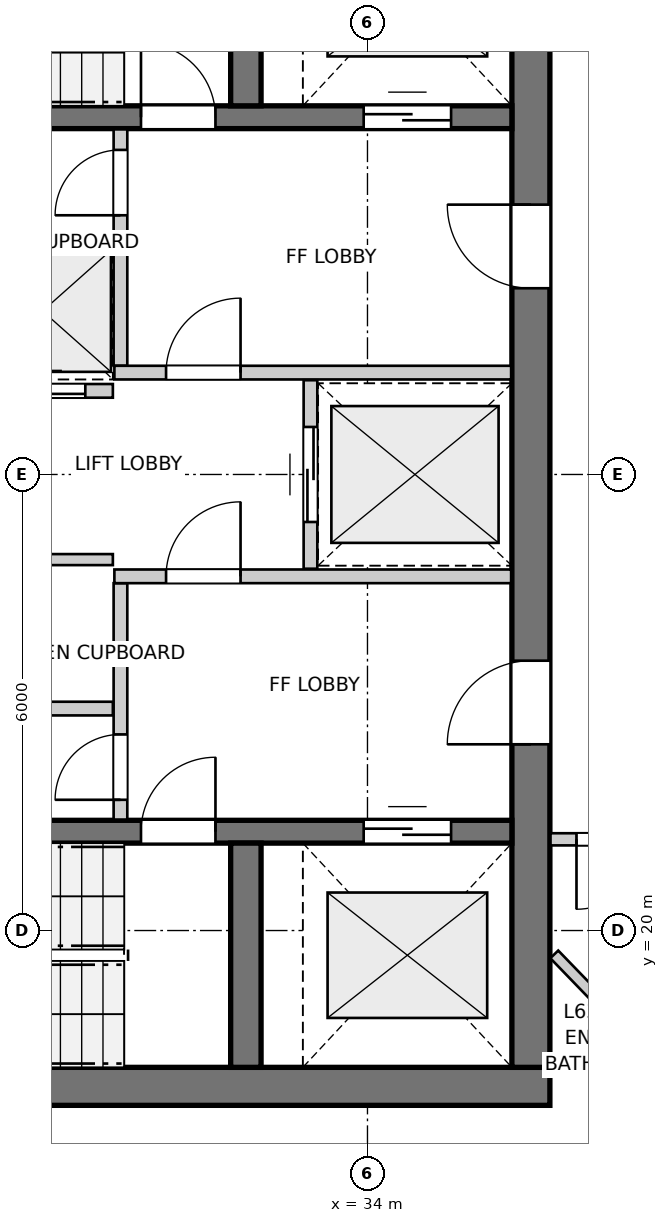
"""IFC4 building model, lengths in metres.
Left out: names, types, materials, properties, quantities, classifications, styles, units other than length and angle.
Written with IfcOpenShell. Run it as: python <this file> out.ifc"""

import sys

from ifc_helpers import new_model, si_unit, direction, frame, frame_2d, origin, place, context, subcontext, project, spatial, rectangle, extrude, source, transform, mapped, element, fill, save


model = new_model("IFC4")
c1 = context("Model", 3, precision=1e-05, world=origin(), true_north=direction((0.0, 1.0)))
c2 = subcontext(c1, "Body", "Model", "MODEL_VIEW")
j1 = project(units=[si_unit("LENGTHUNIT", "METRE"), si_unit("PLANEANGLEUNIT", "RADIAN")], contexts=[c1])
p1 = place(None, origin())
s1 = spatial("IfcSite", under=j1, at=p1, CompositionType="ELEMENT")
p2 = place(p1, origin())
s2 = spatial("IfcBuilding", under=s1, at=p2, CompositionType="ELEMENT")
p3 = place(p2, frame((0.0, 0.0, 211.6)))
s3 = spatial("IfcBuildingStorey", under=s2, at=p3, CompositionType="ELEMENT", Elevation=211.6)
p4 = place(p3, frame((24.3, 17.95, 0.0), z_axis=(0.0, 0.0, 1.0), x_axis=(1.0, 0.0, 0.0)))
e1 = element("IfcWall", 1, at=p4, inside=s3, PredefinedType="SHEAR", context=c2, shape_type="SweptSolid", body=[
    extrude(rectangle(XDim=12.1, YDim=0.5, at=frame_2d((6.05, 0.0))), origin(), (0.0, 0.0, 1.0), 2.96),
])
p5 = place(p3, frame((36.15, 18.2, 0.0), z_axis=(0.0, 0.0, 1.0), x_axis=(0.0, 1.0, 0.0)))
e2 = element("IfcWall", 2, at=p5, inside=s3, PredefinedType="SHEAR", context=c2, shape_type="SweptSolid", body=[
    extrude(rectangle(XDim=15.6, YDim=0.5, at=frame_2d((7.8, 0.0))), origin(), (0.0, 0.0, 1.0), 2.96),
])
p6 = place(p5, frame((4.25, 0.0, 0.0)))
e3 = element("IfcOpeningElement", 3, at=p6, cuts=e2, PredefinedType="OPENING", context=c2, shape_type="SweptSolid", body=[
    extrude(rectangle(XDim=1.1, YDim=2.15, at=frame_2d((0.55, 1.075))), frame((0.0, 0.26, 0.0), z_axis=(0.0, -1.0, 0.0), x_axis=(1.0, 0.0, 0.0)), (0.0, 0.0, 1.0), 0.52),
])
p7 = place(p5, frame((10.25, 0.0, 0.0)))
e4 = element("IfcOpeningElement", 4, at=p7, cuts=e2, PredefinedType="OPENING", context=c2, shape_type="SweptSolid", body=[
    extrude(rectangle(XDim=1.1, YDim=2.15, at=frame_2d((0.55, 1.075))), frame((0.0, 0.26, 0.0), z_axis=(0.0, -1.0, 0.0), x_axis=(1.0, 0.0, 0.0)), (0.0, 0.0, 1.0), 0.52),
])
p8 = place(p3, frame((24.8, 21.3, 0.0), z_axis=(0.0, 0.0, 1.0), x_axis=(1.0, 0.0, 0.0)))
e5 = element("IfcWall", 5, at=p8, inside=s3, PredefinedType="SHEAR", context=c2, shape_type="SweptSolid", body=[
    extrude(rectangle(XDim=11.1, YDim=0.3, at=frame_2d((5.55, 0.0))), origin(), (0.0, 0.0, 1.0), 2.96),
])
p9 = place(p8, frame((6.22, 0.0, 0.0)))
e6 = element("IfcOpeningElement", 6, at=p9, cuts=e5, PredefinedType="OPENING", context=c2, shape_type="SweptSolid", body=[
    extrude(rectangle(XDim=0.98, YDim=2.15, at=frame_2d((0.49, 1.075))), frame((0.0, 0.16, 0.0), z_axis=(0.0, -1.0, 0.0), x_axis=(1.0, 0.0, 0.0)), (0.0, 0.0, 1.0), 0.32),
])
p10 = place(p8, frame((9.15, 0.0, 0.0)))
e7 = element("IfcOpeningElement", 7, at=p10, cuts=e5, PredefinedType="OPENING", context=c2, shape_type="SweptSolid", body=[
    extrude(rectangle(XDim=1.15, YDim=2.15, at=frame_2d((0.575, 1.075))), frame((0.0, 0.16, 0.0), z_axis=(0.0, -1.0, 0.0), x_axis=(1.0, 0.0, 0.0)), (0.0, 0.0, 1.0), 0.32),
])
p11 = place(p3, frame((32.4, 18.2, 0.0), z_axis=(0.0, 0.0, 1.0), x_axis=(0.0, 1.0, 0.0)))
e8 = element("IfcWall", 8, at=p11, inside=s3, PredefinedType="SHEAR", context=c2, shape_type="SweptSolid", body=[
    extrude(rectangle(XDim=2.95, YDim=0.4, at=frame_2d((1.475, 0.0))), origin(), (0.0, 0.0, 1.0), 2.96),
])
p12 = place(p3, frame((24.8, 30.7, 0.0), z_axis=(0.0, 0.0, 1.0), x_axis=(1.0, 0.0, 0.0)))
e9 = element("IfcWall", 9, at=p12, inside=s3, PredefinedType="SHEAR", context=c2, shape_type="SweptSolid", body=[
    extrude(rectangle(XDim=11.1, YDim=0.3, at=frame_2d((5.55, 0.0))), origin(), (0.0, 0.0, 1.0), 2.96),
])
p13 = place(p12, frame((6.22, 0.0, 0.0)))
e10 = element("IfcOpeningElement", 10, at=p13, cuts=e9, PredefinedType="OPENING", context=c2, shape_type="SweptSolid", body=[
    extrude(rectangle(XDim=0.98, YDim=2.15, at=frame_2d((0.49, 1.075))), frame((0.0, 0.16, 0.0), z_axis=(0.0, -1.0, 0.0), x_axis=(1.0, 0.0, 0.0)), (0.0, 0.0, 1.0), 0.32),
])
p14 = place(p12, frame((9.15, 0.0, 0.0)))
e11 = element("IfcOpeningElement", 11, at=p14, cuts=e9, PredefinedType="OPENING", context=c2, shape_type="SweptSolid", body=[
    extrude(rectangle(XDim=1.15, YDim=2.15, at=frame_2d((0.575, 1.075))), frame((0.0, 0.16, 0.0), z_axis=(0.0, -1.0, 0.0), x_axis=(1.0, 0.0, 0.0)), (0.0, 0.0, 1.0), 0.32),
])
p15 = place(p3, frame((32.4, 30.85, 0.0), z_axis=(0.0, 0.0, 1.0), x_axis=(0.0, 1.0, 0.0)))
e12 = element("IfcWall", 12, at=p15, inside=s3, PredefinedType="SHEAR", context=c2, shape_type="SweptSolid", body=[
    extrude(rectangle(XDim=2.95, YDim=0.4, at=frame_2d((1.475, 0.0))), origin(), (0.0, 0.0, 1.0), 2.96),
])
p16 = place(p3, frame((30.75, 21.46, 0.0), z_axis=(0.0, 0.0, 1.0), x_axis=(0.0, 1.0, 0.0)))
e13 = element("IfcWall", 13, at=p16, inside=s3, PredefinedType="PARTITIONING", context=c2, shape_type="SweptSolid", body=[
    extrude(rectangle(XDim=3.11, YDim=0.18, at=frame_2d((1.555, 0.0))), origin(), (0.0, 0.0, 1.0), 2.96),
])
p17 = place(p16, frame((0.26, 0.0, 0.0)))
e14 = element("IfcOpeningElement", 14, at=p17, cuts=e13, PredefinedType="OPENING", context=c2, shape_type="SweptSolid", body=[
    extrude(rectangle(XDim=0.86, YDim=2.05, at=frame_2d((0.43, 1.025))), frame((0.0, 0.1, 0.0), z_axis=(0.0, -1.0, 0.0), x_axis=(1.0, 0.0, 0.0)), (0.0, 0.0, 1.0), 0.2),
])
p18 = place(p3, frame((30.67, 24.66, 0.0), z_axis=(0.0, 0.0, 1.0), x_axis=(1.0, 0.0, 0.0)))
e15 = element("IfcWall", 15, at=p18, inside=s3, PredefinedType="PARTITIONING", context=c2, shape_type="SweptSolid", body=[
    extrude(rectangle(XDim=5.22, YDim=0.18, at=frame_2d((2.61, 0.0))), origin(), (0.0, 0.0, 1.0), 2.96),
])
p19 = place(p18, frame((0.68, 0.0, 0.0)))
e16 = element("IfcOpeningElement", 16, at=p19, cuts=e15, PredefinedType="OPENING", context=c2, shape_type="SweptSolid", body=[
    extrude(rectangle(XDim=0.98, YDim=2.15, at=frame_2d((0.49, 1.075))), frame((0.0, 0.1, 0.0), z_axis=(0.0, -1.0, 0.0), x_axis=(1.0, 0.0, 0.0)), (0.0, 0.0, 1.0), 0.2),
])
p20 = place(p3, frame((30.75, 27.43, 0.0), z_axis=(0.0, 0.0, 1.0), x_axis=(0.0, 1.0, 0.0)))
e17 = element("IfcWall", 17, at=p20, inside=s3, PredefinedType="PARTITIONING", context=c2, shape_type="SweptSolid", body=[
    extrude(rectangle(XDim=3.11, YDim=0.18, at=frame_2d((1.555, 0.0))), origin(), (0.0, 0.0, 1.0), 2.96),
])
p21 = place(p20, frame((1.98, 0.0, 0.0)))
e18 = element("IfcOpeningElement", 18, at=p21, cuts=e17, PredefinedType="OPENING", context=c2, shape_type="SweptSolid", body=[
    extrude(rectangle(XDim=0.86, YDim=2.05, at=frame_2d((0.43, 1.025))), frame((0.0, 0.1, 0.0), z_axis=(0.0, -1.0, 0.0), x_axis=(1.0, 0.0, 0.0)), (0.0, 0.0, 1.0), 0.2),
])
p22 = place(p3, frame((30.67, 27.34, 0.0), z_axis=(0.0, 0.0, 1.0), x_axis=(1.0, 0.0, 0.0)))
e19 = element("IfcWall", 19, at=p22, inside=s3, PredefinedType="PARTITIONING", context=c2, shape_type="SweptSolid", body=[
    extrude(rectangle(XDim=5.22, YDim=0.18, at=frame_2d((2.61, 0.0))), origin(), (0.0, 0.0, 1.0), 2.96),
])
p23 = place(p22, frame((0.68, 0.0, 0.0)))
e20 = element("IfcOpeningElement", 20, at=p23, cuts=e19, PredefinedType="OPENING", context=c2, shape_type="SweptSolid", body=[
    extrude(rectangle(XDim=0.98, YDim=2.15, at=frame_2d((0.49, 1.075))), frame((0.0, 0.1, 0.0), z_axis=(0.0, -1.0, 0.0), x_axis=(1.0, 0.0, 0.0)), (0.0, 0.0, 1.0), 0.2),
])
p24 = place(p3, frame((33.25, 24.76, 0.0), z_axis=(0.0, 0.0, 1.0), x_axis=(0.0, 1.0, 0.0)))
e21 = element("IfcWall", 21, at=p24, inside=s3, PredefinedType="PARTITIONING", context=c2, shape_type="SweptSolid", body=[
    extrude(rectangle(XDim=2.48, YDim=0.18, at=frame_2d((1.24, 0.0))), origin(), (0.0, 0.0, 1.0), 2.96),
])
p25 = place(p24, frame((0.615, 0.0, 0.0)))
e22 = element("IfcOpeningElement", 22, at=p25, cuts=e21, PredefinedType="OPENING", context=c2, shape_type="SweptSolid", body=[
    extrude(rectangle(XDim=1.25, YDim=2.15, at=frame_2d((0.625, 1.075))), frame((0.0, 0.1, 0.0), z_axis=(0.0, -1.0, 0.0), x_axis=(1.0, 0.0, 0.0)), (0.0, 0.0, 1.0), 0.2),
])
p26 = place(p3, frame((24.81, 22.92, 0.0), z_axis=(0.0, 0.0, 1.0), x_axis=(1.0, 0.0, 0.0)))
e23 = element("IfcWall", 23, at=p26, inside=s3, PredefinedType="PARTITIONING", context=c2, shape_type="SweptSolid", body=[
    extrude(rectangle(XDim=5.84, YDim=0.18, at=frame_2d((2.92, 0.0))), origin(), (0.0, 0.0, 1.0), 2.96),
])
p27 = place(p3, frame((28.13, 24.88, 0.0), z_axis=(0.0, 0.0, 1.0), x_axis=(1.0, 0.0, 0.0)))
e24 = element("IfcWall", 24, at=p27, inside=s3, PredefinedType="PARTITIONING", context=c2, shape_type="SweptSolid", body=[
    extrude(rectangle(XDim=2.52, YDim=0.145, at=frame_2d((1.26, 0.0))), origin(), (0.0, 0.0, 1.0), 2.96),
])
p28 = place(p27, frame((0.82, 0.0, 0.0)))
e25 = element("IfcOpeningElement", 25, at=p28, cuts=e24, PredefinedType="OPENING", context=c2, shape_type="SweptSolid", body=[
    extrude(rectangle(XDim=0.86, YDim=2.05, at=frame_2d((0.43, 1.025))), frame((0.0, 0.083, 0.0), z_axis=(0.0, -1.0, 0.0), x_axis=(1.0, 0.0, 0.0)), (0.0, 0.0, 1.0), 0.165),
])
p29 = place(p3, frame((24.81, 29.08, 0.0), z_axis=(0.0, 0.0, 1.0), x_axis=(1.0, 0.0, 0.0)))
e26 = element("IfcWall", 26, at=p29, inside=s3, PredefinedType="PARTITIONING", context=c2, shape_type="SweptSolid", body=[
    extrude(rectangle(XDim=5.84, YDim=0.18, at=frame_2d((2.92, 0.0))), origin(), (0.0, 0.0, 1.0), 2.96),
])
p30 = place(p3, frame((28.825, 27.1, 0.0), z_axis=(0.0, 0.0, 1.0), x_axis=(1.0, 0.0, 0.0)))
e27 = element("IfcWall", 27, at=p30, inside=s3, PredefinedType="PARTITIONING", context=c2, shape_type="SweptSolid", body=[
    extrude(rectangle(XDim=1.825, YDim=0.18, at=frame_2d((0.913, 0.0))), origin(), (0.0, 0.0, 1.0), 2.96),
])
p31 = place(p30, frame((0.363, 0.0, 0.0)))
e28 = element("IfcOpeningElement", 28, at=p31, cuts=e27, PredefinedType="OPENING", context=c2, shape_type="SweptSolid", body=[
    extrude(rectangle(XDim=1.1, YDim=2.15, at=frame_2d((0.55, 1.075))), frame((0.0, 0.1, 0.0), z_axis=(0.0, -1.0, 0.0), x_axis=(1.0, 0.0, 0.0)), (0.0, 0.0, 1.0), 0.2),
])
p32 = place(p3, frame((38.02, 21.2, 0.0), z_axis=(0.0, 0.0, 1.0), x_axis=(-1.0, 0.0, 0.0)))
e29 = element("IfcWall", 29, at=p32, inside=s3, PredefinedType="PARTITIONING", context=c2, shape_type="SweptSolid", body=[
    extrude(rectangle(XDim=1.612, YDim=0.16, at=frame_2d((0.806, 0.0))), origin(), (0.0, 0.0, 1.0), 2.96),
])
p33 = place(p32, frame((0.35, 0.0, 0.0)))
e30 = element("IfcOpeningElement", 30, at=p33, cuts=e29, PredefinedType="OPENING", context=c2, shape_type="SweptSolid", body=[
    extrude(rectangle(XDim=0.92, YDim=2.1, at=frame_2d((0.46, 1.05))), frame((0.0, 0.09, 0.0), z_axis=(0.0, -1.0, 0.0), x_axis=(1.0, 0.0, 0.0)), (0.0, 0.0, 1.0), 0.18),
])
p34 = place(p3, frame((36.458, 19.686, 0.0), z_axis=(0.0, 0.0, 1.0), x_axis=(0.695231916786, -0.718785490868, 0.0)))
e31 = element("IfcWall", 31, at=p34, inside=s3, PredefinedType="PARTITIONING", context=c2, shape_type="SweptSolid", body=[
    extrude(rectangle(XDim=1.824, YDim=0.145, at=frame_2d((0.912, 0.0))), origin(), (0.0, 0.0, 1.0), 2.96),
])
m1 = source(origin(), c2, "Body", "SweptSolid", [
    extrude(rectangle(XDim=0.98, YDim=2.15, at=frame_2d((0.49, 1.075))), frame((0.0, 0.025, 0.0), z_axis=(0.0, -1.0, 0.0), x_axis=(1.0, 0.0, 0.0)), (0.0, 0.0, 1.0), 0.05),
])
p35 = place(p9, origin())
e32 = element("IfcDoor", 32, at=p35, inside=s3, OperationType="SINGLE_SWING_RIGHT", PredefinedType="DOOR", context=c2, shape_type="MappedRepresentation", body=[
    mapped(m1, transform((0.0, 0.0, 0.0), x_axis=(1.0, 0.0, 0.0), y_axis=(0.0, 1.0, 0.0), z_axis=(0.0, 0.0, 1.0), scale=1.0)),
])
fill(e6, e32)
m2 = source(origin(), c2, "Body", "SweptSolid", [
    extrude(rectangle(XDim=1.15, YDim=2.15, at=frame_2d((0.575, 1.075))), frame((0.0, 0.025, 0.0), z_axis=(0.0, -1.0, 0.0), x_axis=(1.0, 0.0, 0.0)), (0.0, 0.0, 1.0), 0.05),
])
p36 = place(p10, origin())
e33 = element("IfcDoor", 33, at=p36, inside=s3, OperationType="DOUBLE_DOOR_SLIDING", PredefinedType="DOOR", context=c2, shape_type="MappedRepresentation", body=[
    mapped(m2, transform((0.0, 0.0, 0.0), x_axis=(1.0, 0.0, 0.0), y_axis=(0.0, 1.0, 0.0), z_axis=(0.0, 0.0, 1.0), scale=1.0)),
])
fill(e7, e33)
p37 = place(p13, origin())
e34 = element("IfcDoor", 34, at=p37, inside=s3, OperationType="SINGLE_SWING_LEFT", PredefinedType="DOOR", context=c2, shape_type="MappedRepresentation", body=[
    mapped(m1, transform((0.0, 0.0, 0.0), x_axis=(1.0, 0.0, 0.0), y_axis=(0.0, 1.0, 0.0), z_axis=(0.0, 0.0, 1.0), scale=1.0)),
])
fill(e10, e34)
p38 = place(p14, origin())
e35 = element("IfcDoor", 35, at=p38, inside=s3, OperationType="DOUBLE_DOOR_SLIDING", PredefinedType="DOOR", context=c2, shape_type="MappedRepresentation", body=[
    mapped(m2, transform((0.0, 0.0, 0.0), x_axis=(1.0, 0.0, 0.0), y_axis=(0.0, 1.0, 0.0), z_axis=(0.0, 0.0, 1.0), scale=1.0)),
])
fill(e11, e35)
m3 = source(origin(), c2, "Body", "SweptSolid", [
    extrude(rectangle(XDim=1.1, YDim=2.15, at=frame_2d((0.55, 1.075))), frame((0.0, 0.025, 0.0), z_axis=(0.0, -1.0, 0.0), x_axis=(1.0, 0.0, 0.0)), (0.0, 0.0, 1.0), 0.05),
])
p39 = place(p6, origin())
e36 = element("IfcDoor", 36, at=p39, inside=s3, OperationType="SINGLE_SWING_LEFT", PredefinedType="DOOR", context=c2, shape_type="MappedRepresentation", body=[
    mapped(m3, transform((0.0, 0.0, 0.0), x_axis=(1.0, 0.0, 0.0), y_axis=(0.0, 1.0, 0.0), z_axis=(0.0, 0.0, 1.0), scale=1.0)),
])
fill(e3, e36)
p40 = place(p7, origin())
e37 = element("IfcDoor", 37, at=p40, inside=s3, OperationType="SINGLE_SWING_RIGHT", PredefinedType="DOOR", context=c2, shape_type="MappedRepresentation", body=[
    mapped(m3, transform((0.0, 0.0, 0.0), x_axis=(1.0, 0.0, 0.0), y_axis=(0.0, 1.0, 0.0), z_axis=(0.0, 0.0, 1.0), scale=1.0)),
])
fill(e4, e37)
m4 = source(origin(), c2, "Body", "SweptSolid", [
    extrude(rectangle(XDim=0.86, YDim=2.05, at=frame_2d((0.43, 1.025))), frame((0.0, 0.025, 0.0), z_axis=(0.0, -1.0, 0.0), x_axis=(1.0, 0.0, 0.0)), (0.0, 0.0, 1.0), 0.05),
])
p41 = place(p17, origin())
e38 = element("IfcDoor", 38, at=p41, inside=s3, OperationType="SINGLE_SWING_LEFT", PredefinedType="DOOR", context=c2, shape_type="MappedRepresentation", body=[
    mapped(m4, transform((0.0, 0.0, 0.0), x_axis=(1.0, 0.0, 0.0), y_axis=(0.0, 1.0, 0.0), z_axis=(0.0, 0.0, 1.0), scale=1.0)),
])
fill(e14, e38)
p42 = place(p19, origin())
e39 = element("IfcDoor", 39, at=p42, inside=s3, OperationType="SINGLE_SWING_RIGHT", PredefinedType="DOOR", context=c2, shape_type="MappedRepresentation", body=[
    mapped(m1, transform((0.0, 0.0, 0.0), x_axis=(1.0, 0.0, 0.0), y_axis=(0.0, 1.0, 0.0), z_axis=(0.0, 0.0, 1.0), scale=1.0)),
])
fill(e16, e39)
p43 = place(p21, origin())
e40 = element("IfcDoor", 40, at=p43, inside=s3, OperationType="SINGLE_SWING_LEFT", PredefinedType="DOOR", context=c2, shape_type="MappedRepresentation", body=[
    mapped(m4, transform((0.0, 0.0, 0.0), x_axis=(1.0, 0.0, 0.0), y_axis=(0.0, 1.0, 0.0), z_axis=(0.0, 0.0, 1.0), scale=1.0)),
])
fill(e18, e40)
p44 = place(p23, origin())
e41 = element("IfcDoor", 41, at=p44, inside=s3, OperationType="SINGLE_SWING_RIGHT", PredefinedType="DOOR", context=c2, shape_type="MappedRepresentation", body=[
    mapped(m1, transform((0.0, 0.0, 0.0), x_axis=(1.0, 0.0, 0.0), y_axis=(0.0, 1.0, 0.0), z_axis=(0.0, 0.0, 1.0), scale=1.0)),
])
fill(e20, e41)
m5 = source(origin(), c2, "Body", "SweptSolid", [
    extrude(rectangle(XDim=1.25, YDim=2.15, at=frame_2d((0.625, 1.075))), frame((0.0, 0.025, 0.0), z_axis=(0.0, -1.0, 0.0), x_axis=(1.0, 0.0, 0.0)), (0.0, 0.0, 1.0), 0.05),
])
p45 = place(p25, origin())
e42 = element("IfcDoor", 42, at=p45, inside=s3, OperationType="DOUBLE_DOOR_SLIDING", PredefinedType="DOOR", context=c2, shape_type="MappedRepresentation", body=[
    mapped(m5, transform((0.0, 0.0, 0.0), x_axis=(1.0, 0.0, 0.0), y_axis=(0.0, 1.0, 0.0), z_axis=(0.0, 0.0, 1.0), scale=1.0)),
])
fill(e22, e42)
p46 = place(p31, origin())
e43 = element("IfcDoor", 43, at=p46, inside=s3, OperationType="DOUBLE_DOOR_SLIDING", PredefinedType="DOOR", context=c2, shape_type="MappedRepresentation", body=[
    mapped(m3, transform((0.0, 0.0, 0.0), x_axis=(1.0, 0.0, 0.0), y_axis=(0.0, 1.0, 0.0), z_axis=(0.0, 0.0, 1.0), scale=1.0)),
])
fill(e28, e43)
m6 = source(origin(), c2, "Body", "SweptSolid", [
    extrude(rectangle(XDim=0.92, YDim=2.1, at=frame_2d((0.46, 1.05))), frame((0.0, 0.025, 0.0), z_axis=(0.0, -1.0, 0.0), x_axis=(1.0, 0.0, 0.0)), (0.0, 0.0, 1.0), 0.05),
])
p47 = place(p33, origin())
e44 = element("IfcDoor", 44, at=p47, inside=s3, OperationType="SINGLE_SWING_RIGHT", PredefinedType="DOOR", context=c2, shape_type="MappedRepresentation", body=[
    mapped(m6, transform((0.0, 0.0, 0.0), x_axis=(1.0, 0.0, 0.0), y_axis=(0.0, 1.0, 0.0), z_axis=(0.0, 0.0, 1.0), scale=1.0)),
])
fill(e30, e44)
save(model, sys.argv[1])
